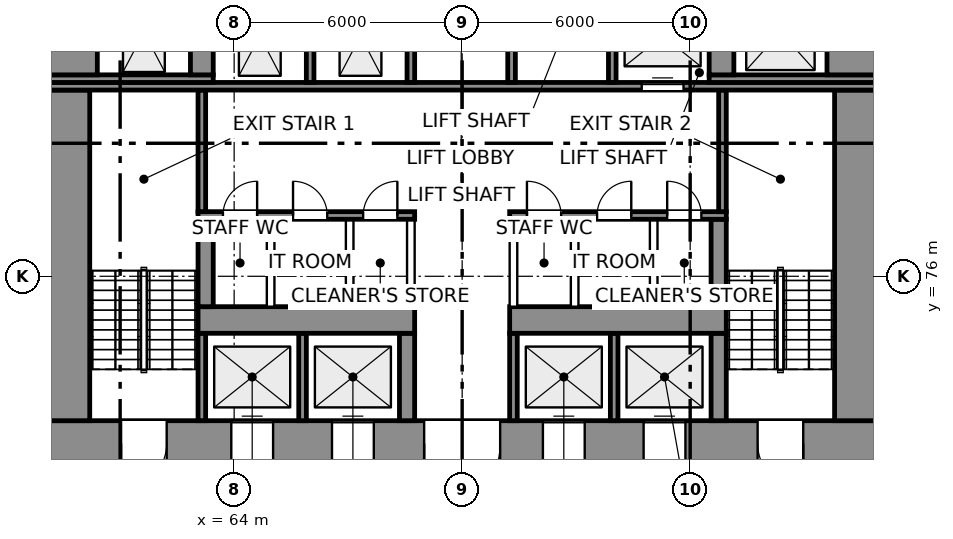
"""IFC4 building model, lengths in metres.
Left out: names, types, materials, properties, quantities, classifications, styles, units other than length and angle.
Written with IfcOpenShell. Run it as: python <this file> out.ifc"""

import sys

from ifc_helpers import new_model, si_unit, direction, frame, frame_2d, origin, place, context, subcontext, project, spatial, rectangle, extrude, element, fill, save


model = new_model("IFC4")
c1 = context("Model", 3, precision=1e-05, world=origin(), true_north=direction((0.0, 1.0)))
c2 = subcontext(c1, "Body", "Model", "MODEL_VIEW")
j1 = project(units=[si_unit("LENGTHUNIT", "METRE"), si_unit("PLANEANGLEUNIT", "RADIAN")], contexts=[c1])
p1 = place(None, origin())
s1 = spatial("IfcSite", under=j1, at=p1, CompositionType="ELEMENT")
p2 = place(p1, origin())
s2 = spatial("IfcBuilding", under=s1, at=p2, CompositionType="ELEMENT")
p3 = place(p2, frame((0.0, 0.0, 39.0)))
s3 = spatial("IfcBuildingStorey", under=s2, at=p3, CompositionType="ELEMENT", Elevation=39.0)
p4 = place(p3, frame((59.0, 71.6, 0.0), z_axis=(0.0, 0.0, 1.0), x_axis=(1.0, 0.0, 0.0)))
e1 = element("IfcWall", 1, at=p4, inside=s3, PredefinedType="SHEAR", context=c2, shape_type="SweptSolid", body=[
    extrude(rectangle(XDim=22.0, YDim=1.2, at=frame_2d((11.0, 0.0))), origin(), (0.0, 0.0, 1.0), 3.9),
])
p5 = place(p4, frame((2.025, 0.0, 0.0)))
e2 = element("IfcOpeningElement", 2, at=p5, cuts=e1, PredefinedType="OPENING", context=c2, shape_type="SweptSolid", body=[
    extrude(rectangle(XDim=1.2, YDim=2.1, at=frame_2d((0.6, 1.05))), frame((0.0, 0.61, 0.0), z_axis=(0.0, -1.0, 0.0), x_axis=(1.0, 0.0, 0.0)), (0.0, 0.0, 1.0), 1.22),
])
p6 = place(p4, frame((18.775, 0.0, 0.0)))
e3 = element("IfcOpeningElement", 3, at=p6, cuts=e1, PredefinedType="OPENING", context=c2, shape_type="SweptSolid", body=[
    extrude(rectangle(XDim=1.2, YDim=2.1, at=frame_2d((0.6, 1.05))), frame((0.0, 0.61, 0.0), z_axis=(0.0, -1.0, 0.0), x_axis=(1.0, 0.0, 0.0)), (0.0, 0.0, 1.0), 1.22),
])
p7 = place(p4, frame((10.0, 0.0, 0.0)))
e4 = element("IfcOpeningElement", 4, at=p7, cuts=e1, PredefinedType="OPENING", context=c2, shape_type="SweptSolid", body=[
    extrude(rectangle(XDim=2.0, YDim=2.1, at=frame_2d((1.0, 1.05))), frame((0.0, 0.61, 0.0), z_axis=(0.0, -1.0, 0.0), x_axis=(1.0, 0.0, 0.0)), (0.0, 0.0, 1.0), 1.22),
])
p8 = place(p4, frame((4.925, 0.0, 0.0)))
e5 = element("IfcOpeningElement", 5, at=p8, cuts=e1, PredefinedType="OPENING", context=c2, shape_type="SweptSolid", body=[
    extrude(rectangle(XDim=1.1, YDim=2.1, at=frame_2d((0.55, 1.05))), frame((0.0, 0.61, 0.0), z_axis=(0.0, -1.0, 0.0), x_axis=(1.0, 0.0, 0.0)), (0.0, 0.0, 1.0), 1.22),
])
p9 = place(p4, frame((7.575, 0.0, 0.0)))
e6 = element("IfcOpeningElement", 6, at=p9, cuts=e1, PredefinedType="OPENING", context=c2, shape_type="SweptSolid", body=[
    extrude(rectangle(XDim=1.1, YDim=2.1, at=frame_2d((0.55, 1.05))), frame((0.0, 0.61, 0.0), z_axis=(0.0, -1.0, 0.0), x_axis=(1.0, 0.0, 0.0)), (0.0, 0.0, 1.0), 1.22),
])
p10 = place(p4, frame((13.125, 0.0, 0.0)))
e7 = element("IfcOpeningElement", 7, at=p10, cuts=e1, PredefinedType="OPENING", context=c2, shape_type="SweptSolid", body=[
    extrude(rectangle(XDim=1.1, YDim=2.1, at=frame_2d((0.55, 1.05))), frame((0.0, 0.61, 0.0), z_axis=(0.0, -1.0, 0.0), x_axis=(1.0, 0.0, 0.0)), (0.0, 0.0, 1.0), 1.22),
])
p11 = place(p4, frame((15.775, 0.0, 0.0)))
e8 = element("IfcOpeningElement", 8, at=p11, cuts=e1, PredefinedType="OPENING", context=c2, shape_type="SweptSolid", body=[
    extrude(rectangle(XDim=1.1, YDim=2.1, at=frame_2d((0.55, 1.05))), frame((0.0, 0.61, 0.0), z_axis=(0.0, -1.0, 0.0), x_axis=(1.0, 0.0, 0.0)), (0.0, 0.0, 1.0), 1.22),
])
p12 = place(p3, frame((59.6, 72.2, 0.0), z_axis=(0.0, 0.0, 1.0), x_axis=(0.0, 1.0, 0.0)))
e9 = element("IfcWall", 9, at=p12, inside=s3, PredefinedType="SHEAR", context=c2, shape_type="SweptSolid", body=[
    extrude(rectangle(XDim=8.7, YDim=1.2, at=frame_2d((4.35, 0.0))), origin(), (0.0, 0.0, 1.0), 3.9),
])
for number, where, z_axis, x_axis in (
    (10, (63.15, 72.2, 0.0), (0.0, 0.0, 1.0), (0.0, 1.0, 0.0)),
    (11, (65.8, 72.2, 0.0), (0.0, 0.0, 1.0), (0.0, 1.0, 0.0)),
):
    element("IfcWall", number, at=place(p3, frame(where, z_axis=z_axis, x_axis=x_axis)), inside=s3, PredefinedType="SHEAR", context=c2, shape_type="SweptSolid", body=[
        extrude(rectangle(XDim=2.3, YDim=0.2, at=frame_2d((1.15, 0.0))), origin(), (0.0, 0.0, 1.0), 3.9),
    ])
p13 = place(p3, frame((68.55, 72.2, 0.0), z_axis=(0.0, 0.0, 1.0), x_axis=(0.0, 1.0, 0.0)))
e12 = element("IfcWall", 12, at=p13, inside=s3, PredefinedType="SHEAR", context=c2, shape_type="SweptSolid", body=[
    extrude(rectangle(XDim=2.3, YDim=0.4, at=frame_2d((1.15, 0.0))), origin(), (0.0, 0.0, 1.0), 3.9),
])
for number, where, z_axis, x_axis in (
    (13, (71.35, 72.2, 0.0), (0.0, 0.0, 1.0), (0.0, 1.0, 0.0)),
    (14, (74.0, 72.2, 0.0), (0.0, 0.0, 1.0), (0.0, 1.0, 0.0)),
):
    element("IfcWall", number, at=place(p3, frame(where, z_axis=z_axis, x_axis=x_axis)), inside=s3, PredefinedType="SHEAR", context=c2, shape_type="SweptSolid", body=[
        extrude(rectangle(XDim=2.3, YDim=0.2, at=frame_2d((1.15, 0.0))), origin(), (0.0, 0.0, 1.0), 3.9),
    ])
p14 = place(p3, frame((76.75, 72.2, 0.0), z_axis=(0.0, 0.0, 1.0), x_axis=(0.0, 1.0, 0.0)))
e15 = element("IfcWall", 15, at=p14, inside=s3, PredefinedType="SHEAR", context=c2, shape_type="SweptSolid", body=[
    extrude(rectangle(XDim=2.3, YDim=0.4, at=frame_2d((1.15, 0.0))), origin(), (0.0, 0.0, 1.0), 3.9),
])
p15 = place(p3, frame((80.4, 72.2, 0.0), z_axis=(0.0, 0.0, 1.0), x_axis=(0.0, 1.0, 0.0)))
e16 = element("IfcWall", 16, at=p15, inside=s3, PredefinedType="SHEAR", context=c2, shape_type="SweptSolid", body=[
    extrude(rectangle(XDim=8.7, YDim=1.2, at=frame_2d((4.35, 0.0))), origin(), (0.0, 0.0, 1.0), 3.9),
])
for number, where, z_axis, x_axis in (
    (17, (63.05, 74.85, 0.0), (0.0, 0.0, 1.0), (1.0, 0.0, 0.0)),
    (18, (71.25, 74.85, 0.0), (0.0, 0.0, 1.0), (1.0, 0.0, 0.0)),
):
    element("IfcWall", number, at=place(p3, frame(where, z_axis=z_axis, x_axis=x_axis)), inside=s3, PredefinedType="SHEAR", context=c2, shape_type="SweptSolid", body=[
        extrude(rectangle(XDim=5.7, YDim=0.7, at=frame_2d((2.85, 0.0))), origin(), (0.0, 0.0, 1.0), 3.9),
    ])
p16 = place(p3, frame((63.25, 75.2, 0.0), z_axis=(0.0, 0.0, 1.0), x_axis=(0.0, 1.0, 0.0)))
e19 = element("IfcWall", 19, at=p16, inside=s3, PredefinedType="SHEAR", context=c2, shape_type="SweptSolid", body=[
    extrude(rectangle(XDim=2.3, YDim=0.4, at=frame_2d((1.15, 0.0))), origin(), (0.0, 0.0, 1.0), 3.9),
])
for number, where, z_axis, x_axis in (
    (20, (64.96, 75.2, 0.0), (0.0, 0.0, 1.0), (0.0, 1.0, 0.0)),
    (21, (67.04, 75.2, 0.0), (0.0, 0.0, 1.0), (0.0, 1.0, 0.0)),
    (22, (68.65, 75.2, 0.0), (0.0, 0.0, 1.0), (0.0, 1.0, 0.0)),
    (23, (71.35, 75.2, 0.0), (0.0, 0.0, 1.0), (0.0, 1.0, 0.0)),
    (24, (72.96, 75.2, 0.0), (0.0, 0.0, 1.0), (0.0, 1.0, 0.0)),
    (25, (75.04, 75.2, 0.0), (0.0, 0.0, 1.0), (0.0, 1.0, 0.0)),
):
    element("IfcWall", number, at=place(p3, frame(where, z_axis=z_axis, x_axis=x_axis)), inside=s3, PredefinedType="PARTITIONING", context=c2, shape_type="SweptSolid", body=[
        extrude(rectangle(XDim=2.3, YDim=0.2, at=frame_2d((1.15, 0.0))), origin(), (0.0, 0.0, 1.0), 3.6),
    ])
p17 = place(p3, frame((76.75, 75.2, 0.0), z_axis=(0.0, 0.0, 1.0), x_axis=(0.0, 1.0, 0.0)))
e26 = element("IfcWall", 26, at=p17, inside=s3, PredefinedType="SHEAR", context=c2, shape_type="SweptSolid", body=[
    extrude(rectangle(XDim=2.3, YDim=0.4, at=frame_2d((1.15, 0.0))), origin(), (0.0, 0.0, 1.0), 3.9),
])
p18 = place(p3, frame((63.05, 77.6, 0.0), z_axis=(0.0, 0.0, 1.0), x_axis=(1.0, 0.0, 0.0)))
e27 = element("IfcWall", 27, at=p18, inside=s3, PredefinedType="SHEAR", context=c2, shape_type="SweptSolid", body=[
    extrude(rectangle(XDim=5.7, YDim=0.2, at=frame_2d((2.85, 0.0))), origin(), (0.0, 0.0, 1.0), 3.9),
])
p19 = place(p18, frame((0.655, 0.0, 0.0)))
e28 = element("IfcOpeningElement", 28, at=p19, cuts=e27, PredefinedType="OPENING", context=c2, shape_type="SweptSolid", body=[
    extrude(rectangle(XDim=0.9, YDim=2.1, at=frame_2d((0.45, 1.05))), frame((0.0, 0.11, 0.0), z_axis=(0.0, -1.0, 0.0), x_axis=(1.0, 0.0, 0.0)), (0.0, 0.0, 1.0), 0.22),
])
p20 = place(p18, frame((2.5, 0.0, 0.0)))
e29 = element("IfcOpeningElement", 29, at=p20, cuts=e27, PredefinedType="OPENING", context=c2, shape_type="SweptSolid", body=[
    extrude(rectangle(XDim=0.9, YDim=2.1, at=frame_2d((0.45, 1.05))), frame((0.0, 0.11, 0.0), z_axis=(0.0, -1.0, 0.0), x_axis=(1.0, 0.0, 0.0)), (0.0, 0.0, 1.0), 0.22),
])
p21 = place(p18, frame((4.345, 0.0, 0.0)))
e30 = element("IfcOpeningElement", 30, at=p21, cuts=e27, PredefinedType="OPENING", context=c2, shape_type="SweptSolid", body=[
    extrude(rectangle(XDim=0.9, YDim=2.1, at=frame_2d((0.45, 1.05))), frame((0.0, 0.11, 0.0), z_axis=(0.0, -1.0, 0.0), x_axis=(1.0, 0.0, 0.0)), (0.0, 0.0, 1.0), 0.22),
])
p22 = place(p3, frame((71.25, 77.6, 0.0), z_axis=(0.0, 0.0, 1.0), x_axis=(1.0, 0.0, 0.0)))
e31 = element("IfcWall", 31, at=p22, inside=s3, PredefinedType="SHEAR", context=c2, shape_type="SweptSolid", body=[
    extrude(rectangle(XDim=5.7, YDim=0.2, at=frame_2d((2.85, 0.0))), origin(), (0.0, 0.0, 1.0), 3.9),
])
p23 = place(p22, frame((0.455, 0.0, 0.0)))
e32 = element("IfcOpeningElement", 32, at=p23, cuts=e31, PredefinedType="OPENING", context=c2, shape_type="SweptSolid", body=[
    extrude(rectangle(XDim=0.9, YDim=2.1, at=frame_2d((0.45, 1.05))), frame((0.0, 0.11, 0.0), z_axis=(0.0, -1.0, 0.0), x_axis=(1.0, 0.0, 0.0)), (0.0, 0.0, 1.0), 0.22),
])
p24 = place(p22, frame((2.3, 0.0, 0.0)))
e33 = element("IfcOpeningElement", 33, at=p24, cuts=e31, PredefinedType="OPENING", context=c2, shape_type="SweptSolid", body=[
    extrude(rectangle(XDim=0.9, YDim=2.1, at=frame_2d((0.45, 1.05))), frame((0.0, 0.11, 0.0), z_axis=(0.0, -1.0, 0.0), x_axis=(1.0, 0.0, 0.0)), (0.0, 0.0, 1.0), 0.22),
])
p25 = place(p22, frame((4.145, 0.0, 0.0)))
e34 = element("IfcOpeningElement", 34, at=p25, cuts=e31, PredefinedType="OPENING", context=c2, shape_type="SweptSolid", body=[
    extrude(rectangle(XDim=0.9, YDim=2.1, at=frame_2d((0.45, 1.05))), frame((0.0, 0.11, 0.0), z_axis=(0.0, -1.0, 0.0), x_axis=(1.0, 0.0, 0.0)), (0.0, 0.0, 1.0), 0.22),
])
for number, where, z_axis, x_axis in (
    (35, (63.15, 77.7, 0.0), (0.0, 0.0, 1.0), (0.0, 1.0, 0.0)),
    (36, (76.85, 77.7, 0.0), (0.0, 0.0, 1.0), (0.0, 1.0, 0.0)),
):
    element("IfcWall", number, at=place(p3, frame(where, z_axis=z_axis, x_axis=x_axis)), inside=s3, PredefinedType="SHEAR", context=c2, shape_type="SweptSolid", body=[
        extrude(rectangle(XDim=3.2, YDim=0.2, at=frame_2d((1.6, 0.0))), origin(), (0.0, 0.0, 1.0), 3.9),
    ])
p26 = place(p3, frame((59.0, 81.0, 0.0), z_axis=(0.0, 0.0, 1.0), x_axis=(1.0, 0.0, 0.0)))
e37 = element("IfcWall", 37, at=p26, inside=s3, PredefinedType="SHEAR", context=c2, shape_type="SweptSolid", body=[
    extrude(rectangle(XDim=22.0, YDim=0.2, at=frame_2d((11.0, 0.0))), origin(), (0.0, 0.0, 1.0), 3.9),
])
p27 = place(p26, frame((15.725, 0.0, 0.0)))
e38 = element("IfcOpeningElement", 38, at=p27, cuts=e37, PredefinedType="OPENING", context=c2, shape_type="SweptSolid", body=[
    extrude(rectangle(XDim=1.1, YDim=2.1, at=frame_2d((0.55, 1.05))), frame((0.0, 0.11, 0.0), z_axis=(0.0, -1.0, 0.0), x_axis=(1.0, 0.0, 0.0)), (0.0, 0.0, 1.0), 0.22),
])
p28 = place(p3, frame((59.0, 81.2, 0.0), z_axis=(0.0, 0.0, 1.0), x_axis=(1.0, 0.0, 0.0)))
e39 = element("IfcWall", 39, at=p28, inside=s3, PredefinedType="SHEAR", context=c2, shape_type="SweptSolid", body=[
    extrude(rectangle(XDim=4.45, YDim=0.2, at=frame_2d((2.225, 0.0))), origin(), (0.0, 0.0, 1.0), 3.9),
])
for number, where, z_axis, x_axis in (
    (40, (66.0, 81.1, 0.0), (0.0, 0.0, 1.0), (0.0, 1.0, 0.0)),
    (41, (68.65, 81.1, 0.0), (0.0, 0.0, 1.0), (0.0, 1.0, 0.0)),
    (42, (71.3, 81.1, 0.0), (0.0, 0.0, 1.0), (0.0, 1.0, 0.0)),
    (43, (73.95, 81.1, 0.0), (0.0, 0.0, 1.0), (0.0, 1.0, 0.0)),
):
    element("IfcWall", number, at=place(p3, frame(where, z_axis=z_axis, x_axis=x_axis)), inside=s3, PredefinedType="SHEAR", context=c2, shape_type="SweptSolid", body=[
        extrude(rectangle(XDim=2.45, YDim=0.2, at=frame_2d((1.225, 0.0))), origin(), (0.0, 0.0, 1.0), 3.9),
    ])
p29 = place(p3, frame((76.5, 81.2, 0.0), z_axis=(0.0, 0.0, 1.0), x_axis=(1.0, 0.0, 0.0)))
e44 = element("IfcWall", 44, at=p29, inside=s3, PredefinedType="SHEAR", context=c2, shape_type="SweptSolid", body=[
    extrude(rectangle(XDim=4.5, YDim=0.2, at=frame_2d((2.25, 0.0))), origin(), (0.0, 0.0, 1.0), 3.9),
])
p30 = place(p3, frame((59.7, 81.3, 0.0), z_axis=(0.0, 0.0, 1.0), x_axis=(0.0, 1.0, 0.0)))
e45 = element("IfcWall", 45, at=p30, inside=s3, PredefinedType="SHEAR", context=c2, shape_type="SweptSolid", body=[
    extrude(rectangle(XDim=2.25, YDim=1.4, at=frame_2d((1.125, 0.0))), origin(), (0.0, 0.0, 1.0), 3.9),
])
p31 = place(p3, frame((63.15, 81.3, 0.0), z_axis=(0.0, 0.0, 1.0), x_axis=(0.0, 1.0, 0.0)))
e46 = element("IfcWall", 46, at=p31, inside=s3, PredefinedType="SHEAR", context=c2, shape_type="SweptSolid", body=[
    extrude(rectangle(XDim=2.25, YDim=0.6, at=frame_2d((1.125, 0.0))), origin(), (0.0, 0.0, 1.0), 3.9),
])
p32 = place(p3, frame((76.825, 81.3, 0.0), z_axis=(0.0, 0.0, 1.0), x_axis=(0.0, 1.0, 0.0)))
e47 = element("IfcWall", 47, at=p32, inside=s3, PredefinedType="SHEAR", context=c2, shape_type="SweptSolid", body=[
    extrude(rectangle(XDim=2.25, YDim=0.65, at=frame_2d((1.125, 0.0))), origin(), (0.0, 0.0, 1.0), 3.9),
])
p33 = place(p3, frame((80.3, 81.3, 0.0), z_axis=(0.0, 0.0, 1.0), x_axis=(0.0, 1.0, 0.0)))
e48 = element("IfcWall", 48, at=p33, inside=s3, PredefinedType="SHEAR", context=c2, shape_type="SweptSolid", body=[
    extrude(rectangle(XDim=2.25, YDim=1.4, at=frame_2d((1.125, 0.0))), origin(), (0.0, 0.0, 1.0), 3.9),
])
p34 = place(p5, frame((1.2, 0.0, 0.0), z_axis=(0.0, 0.0, 1.0), x_axis=(-1.0, 0.0, 0.0)))
e49 = element("IfcDoor", 49, at=p34, inside=s3, OperationType="SINGLE_SWING_RIGHT", PredefinedType="DOOR", context=c2, shape_type="SweptSolid", body=[
    extrude(rectangle(XDim=1.2, YDim=2.1, at=frame_2d((0.6, 1.05))), frame((0.0, 0.025, 0.0), z_axis=(0.0, -1.0, 0.0), x_axis=(1.0, 0.0, 0.0)), (0.0, 0.0, 1.0), 0.05),
])
fill(e2, e49)
p35 = place(p6, frame((1.2, 0.0, 0.0), z_axis=(0.0, 0.0, 1.0), x_axis=(-1.0, 0.0, 0.0)))
e50 = element("IfcDoor", 50, at=p35, inside=s3, OperationType="SINGLE_SWING_LEFT", PredefinedType="DOOR", context=c2, shape_type="SweptSolid", body=[
    extrude(rectangle(XDim=1.2, YDim=2.1, at=frame_2d((0.6, 1.05))), frame((0.0, 0.025, 0.0), z_axis=(0.0, -1.0, 0.0), x_axis=(1.0, 0.0, 0.0)), (0.0, 0.0, 1.0), 0.05),
])
fill(e3, e50)
p36 = place(p7, frame((2.0, 0.0, 0.0), z_axis=(0.0, 0.0, 1.0), x_axis=(-1.0, 0.0, 0.0)))
e51 = element("IfcDoor", 51, at=p36, inside=s3, OperationType="DOUBLE_DOOR_SINGLE_SWING", PredefinedType="DOOR", context=c2, shape_type="SweptSolid", body=[
    extrude(rectangle(XDim=2.0, YDim=2.1, at=frame_2d((1.0, 1.05))), frame((0.0, 0.025, 0.0), z_axis=(0.0, -1.0, 0.0), x_axis=(1.0, 0.0, 0.0)), (0.0, 0.0, 1.0), 0.05),
])
fill(e4, e51)
p37 = place(p27, origin())
e52 = element("IfcDoor", 52, at=p37, inside=s3, OperationType="DOUBLE_DOOR_SLIDING", PredefinedType="DOOR", context=c2, shape_type="SweptSolid", body=[
    extrude(rectangle(XDim=1.1, YDim=2.1, at=frame_2d((0.55, 1.05))), frame((0.0, 0.025, 0.0), z_axis=(0.0, -1.0, 0.0), x_axis=(1.0, 0.0, 0.0)), (0.0, 0.0, 1.0), 0.05),
])
fill(e38, e52)
p38 = place(p8, origin())
e53 = element("IfcDoor", 53, at=p38, inside=s3, OperationType="DOUBLE_DOOR_SLIDING", PredefinedType="DOOR", context=c2, shape_type="SweptSolid", body=[
    extrude(rectangle(XDim=1.1, YDim=2.1, at=frame_2d((0.55, 1.05))), frame((0.0, 0.025, 0.0), z_axis=(0.0, -1.0, 0.0), x_axis=(1.0, 0.0, 0.0)), (0.0, 0.0, 1.0), 0.05),
])
fill(e5, e53)
p39 = place(p9, origin())
e54 = element("IfcDoor", 54, at=p39, inside=s3, OperationType="DOUBLE_DOOR_SLIDING", PredefinedType="DOOR", context=c2, shape_type="SweptSolid", body=[
    extrude(rectangle(XDim=1.1, YDim=2.1, at=frame_2d((0.55, 1.05))), frame((0.0, 0.025, 0.0), z_axis=(0.0, -1.0, 0.0), x_axis=(1.0, 0.0, 0.0)), (0.0, 0.0, 1.0), 0.05),
])
fill(e6, e54)
p40 = place(p10, origin())
e55 = element("IfcDoor", 55, at=p40, inside=s3, OperationType="DOUBLE_DOOR_SLIDING", PredefinedType="DOOR", context=c2, shape_type="SweptSolid", body=[
    extrude(rectangle(XDim=1.1, YDim=2.1, at=frame_2d((0.55, 1.05))), frame((0.0, 0.025, 0.0), z_axis=(0.0, -1.0, 0.0), x_axis=(1.0, 0.0, 0.0)), (0.0, 0.0, 1.0), 0.05),
])
fill(e7, e55)
p41 = place(p11, origin())
e56 = element("IfcDoor", 56, at=p41, inside=s3, OperationType="DOUBLE_DOOR_SLIDING", PredefinedType="DOOR", context=c2, shape_type="SweptSolid", body=[
    extrude(rectangle(XDim=1.1, YDim=2.1, at=frame_2d((0.55, 1.05))), frame((0.0, 0.025, 0.0), z_axis=(0.0, -1.0, 0.0), x_axis=(1.0, 0.0, 0.0)), (0.0, 0.0, 1.0), 0.05),
])
fill(e8, e56)
p42 = place(p19, origin())
e57 = element("IfcDoor", 57, at=p42, inside=s3, OperationType="SINGLE_SWING_RIGHT", PredefinedType="DOOR", context=c2, shape_type="SweptSolid", body=[
    extrude(rectangle(XDim=0.9, YDim=2.1, at=frame_2d((0.45, 1.05))), frame((0.0, 0.025, 0.0), z_axis=(0.0, -1.0, 0.0), x_axis=(1.0, 0.0, 0.0)), (0.0, 0.0, 1.0), 0.05),
])
fill(e28, e57)
p43 = place(p20, origin())
e58 = element("IfcDoor", 58, at=p43, inside=s3, OperationType="SINGLE_SWING_LEFT", PredefinedType="DOOR", context=c2, shape_type="SweptSolid", body=[
    extrude(rectangle(XDim=0.9, YDim=2.1, at=frame_2d((0.45, 1.05))), frame((0.0, 0.025, 0.0), z_axis=(0.0, -1.0, 0.0), x_axis=(1.0, 0.0, 0.0)), (0.0, 0.0, 1.0), 0.05),
])
fill(e29, e58)
p44 = place(p21, origin())
e59 = element("IfcDoor", 59, at=p44, inside=s3, OperationType="SINGLE_SWING_RIGHT", PredefinedType="DOOR", context=c2, shape_type="SweptSolid", body=[
    extrude(rectangle(XDim=0.9, YDim=2.1, at=frame_2d((0.45, 1.05))), frame((0.0, 0.025, 0.0), z_axis=(0.0, -1.0, 0.0), x_axis=(1.0, 0.0, 0.0)), (0.0, 0.0, 1.0), 0.05),
])
fill(e30, e59)
p45 = place(p23, origin())
e60 = element("IfcDoor", 60, at=p45, inside=s3, OperationType="SINGLE_SWING_LEFT", PredefinedType="DOOR", context=c2, shape_type="SweptSolid", body=[
    extrude(rectangle(XDim=0.9, YDim=2.1, at=frame_2d((0.45, 1.05))), frame((0.0, 0.025, 0.0), z_axis=(0.0, -1.0, 0.0), x_axis=(1.0, 0.0, 0.0)), (0.0, 0.0, 1.0), 0.05),
])
fill(e32, e60)
p46 = place(p24, origin())
e61 = element("IfcDoor", 61, at=p46, inside=s3, OperationType="SINGLE_SWING_RIGHT", PredefinedType="DOOR", context=c2, shape_type="SweptSolid", body=[
    extrude(rectangle(XDim=0.9, YDim=2.1, at=frame_2d((0.45, 1.05))), frame((0.0, 0.025, 0.0), z_axis=(0.0, -1.0, 0.0), x_axis=(1.0, 0.0, 0.0)), (0.0, 0.0, 1.0), 0.05),
])
fill(e33, e61)
p47 = place(p25, origin())
e62 = element("IfcDoor", 62, at=p47, inside=s3, OperationType="SINGLE_SWING_LEFT", PredefinedType="DOOR", context=c2, shape_type="SweptSolid", body=[
    extrude(rectangle(XDim=0.9, YDim=2.1, at=frame_2d((0.45, 1.05))), frame((0.0, 0.025, 0.0), z_axis=(0.0, -1.0, 0.0), x_axis=(1.0, 0.0, 0.0)), (0.0, 0.0, 1.0), 0.05),
])
fill(e34, e62)
save(model, sys.argv[1])
